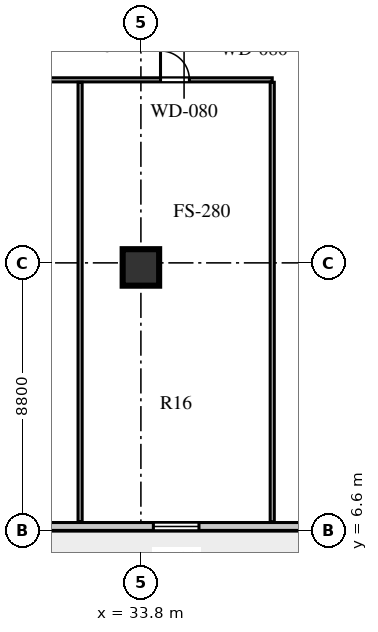
"""IFC4 building model, lengths in metres.
Left out: names, types, materials, properties, quantities, classifications, styles, units other than length and angle.
Written with IfcOpenShell. Run it as: python <this file> out.ifc"""

import sys

from ifc_helpers import new_model, si_unit, direction, frame, frame_2d, origin, origin_2d, place, context, subcontext, project, spatial, rectangle, extrude, element, fill, save


model = new_model("IFC4")
c1 = context("Model", 3, precision=1e-05, world=origin(), true_north=direction((0.0, 1.0)))
c2 = subcontext(c1, "Body", "Model", "MODEL_VIEW")
j1 = project(units=[si_unit("LENGTHUNIT", "METRE"), si_unit("PLANEANGLEUNIT", "RADIAN")], contexts=[c1])
p1 = place(None, origin())
s1 = spatial("IfcSite", under=j1, at=p1, CompositionType="ELEMENT")
p2 = place(p1, origin())
s2 = spatial("IfcBuilding", under=s1, at=p2, CompositionType="ELEMENT")
p3 = place(p2, frame((0.0, 0.0, 42.0)))
s3 = spatial("IfcBuildingStorey", under=s2, at=p3, CompositionType="ELEMENT", Elevation=42.0)
p4 = place(p3, frame((33.8, 15.25, 0.0), z_axis=(0.0, 0.0, 1.0), x_axis=(1.0, 0.0, 0.0)))
e1 = element("IfcColumn", 1, at=p4, inside=s3, PredefinedType="COLUMN", context=c2, shape_type="SweptSolid", body=[
    extrude(rectangle(XDim=1.2, YDim=1.2, at=origin_2d()), origin(), (0.0, 0.0, 1.0), 3.72),
])
p5 = place(p3, frame((12.3, 6.73, 0.0), z_axis=(0.0, 0.0, 1.0), x_axis=(1.0, 0.0, 0.0)))
e2 = element("IfcWall", 2, at=p5, inside=s3, PredefinedType="SOLIDWALL", context=c2, shape_type="SweptSolid", body=[
    extrude(rectangle(XDim=34.0, YDim=0.26, at=frame_2d((17.0, 0.0))), origin(), (0.0, 0.0, 1.0), 3.72),
])
p6 = place(p5, frame((0.95, 0.0, 0.0)))
e3 = element("IfcOpeningElement", 3, at=p6, cuts=e2, PredefinedType="OPENING", context=c2, shape_type="SweptSolid", body=[
    extrude(rectangle(XDim=1.0, YDim=2.05, at=frame_2d((0.5, 1.025))), frame((0.0, 0.14, 0.0), z_axis=(0.0, -1.0, 0.0), x_axis=(1.0, 0.0, 0.0)), (0.0, 0.0, 1.0), 0.28),
])
p7 = place(p5, frame((9.68, 0.0, 0.8)))
e4 = element("IfcOpeningElement", 4, at=p7, cuts=e2, PredefinedType="OPENING", context=c2, shape_type="SweptSolid", body=[
    extrude(rectangle(XDim=1.8, YDim=2.0, at=frame_2d((0.9, 1.0))), frame((0.0, 0.14, 0.0), z_axis=(0.0, -1.0, 0.0), x_axis=(1.0, 0.0, 0.0)), (0.0, 0.0, 1.0), 0.28),
])
p8 = place(p5, frame((21.91, 0.0, 0.8)))
e5 = element("IfcOpeningElement", 5, at=p8, cuts=e2, PredefinedType="OPENING", context=c2, shape_type="SweptSolid", body=[
    extrude(rectangle(XDim=1.5, YDim=2.0, at=frame_2d((0.75, 1.0))), frame((0.0, 0.14, 0.0), z_axis=(0.0, -1.0, 0.0), x_axis=(1.0, 0.0, 0.0)), (0.0, 0.0, 1.0), 0.28),
])
p9 = place(p5, frame((29.255, 0.0, 0.8)))
e6 = element("IfcOpeningElement", 6, at=p9, cuts=e2, PredefinedType="OPENING", context=c2, shape_type="SweptSolid", body=[
    extrude(rectangle(XDim=1.2, YDim=1.75, at=frame_2d((0.6, 0.875))), frame((0.0, 0.14, 0.0), z_axis=(0.0, -1.0, 0.0), x_axis=(1.0, 0.0, 0.0)), (0.0, 0.0, 1.0), 0.28),
])
p10 = place(p3, frame((25.25, 21.42, 0.0), z_axis=(0.0, 0.0, 1.0), x_axis=(1.0, 0.0, 0.0)))
e7 = element("IfcWall", 7, at=p10, inside=s3, PredefinedType="PARTITIONING", context=c2, shape_type="SweptSolid", body=[
    extrude(rectangle(XDim=12.87, YDim=0.135, at=frame_2d((6.435, 0.0))), origin(), (0.0, 0.0, 1.0), 3.32),
])
p11 = place(p10, frame((2.825, 0.0, 0.0)))
e8 = element("IfcOpeningElement", 8, at=p11, cuts=e7, PredefinedType="OPENING", context=c2, shape_type="SweptSolid", body=[
    extrude(rectangle(XDim=0.95, YDim=2.08, at=frame_2d((0.475, 1.04))), frame((0.0, 0.078, 0.0), z_axis=(0.0, -1.0, 0.0), x_axis=(1.0, 0.0, 0.0)), (0.0, 0.0, 1.0), 0.155),
])
p12 = place(p10, frame((9.195, 0.0, 0.0)))
e9 = element("IfcOpeningElement", 9, at=p12, cuts=e7, PredefinedType="OPENING", context=c2, shape_type="SweptSolid", body=[
    extrude(rectangle(XDim=0.95, YDim=2.08, at=frame_2d((0.475, 1.04))), frame((0.0, 0.078, 0.0), z_axis=(0.0, -1.0, 0.0), x_axis=(1.0, 0.0, 0.0)), (0.0, 0.0, 1.0), 0.155),
])
for number, where, z_axis, x_axis in (
    (10, (38.12, 6.88, 0.0), (0.0, 0.0, 1.0), (0.0, 1.0, 0.0)),
    (11, (31.8, 6.88, 0.0), (0.0, 0.0, 1.0), (0.0, 1.0, 0.0)),
):
    element("IfcWall", number, at=place(p3, frame(where, z_axis=z_axis, x_axis=x_axis)), inside=s3, PredefinedType="PARTITIONING", context=c2, shape_type="SweptSolid", body=[
        extrude(rectangle(XDim=14.46, YDim=0.135, at=frame_2d((7.23, 0.0))), origin(), (0.0, 0.0, 1.0), 3.72),
    ])
p13 = place(p8, origin())
e12 = element("IfcWindow", 12, at=p13, inside=s3, PartitioningType="SINGLE_PANEL", PredefinedType="WINDOW", context=c2, shape_type="SweptSolid", body=[
    extrude(rectangle(XDim=1.5, YDim=2.0, at=frame_2d((0.75, 1.0))), frame((0.0, 0.03, 0.0), z_axis=(0.0, -1.0, 0.0), x_axis=(1.0, 0.0, 0.0)), (0.0, 0.0, 1.0), 0.06),
])
fill(e5, e12)
p14 = place(p12, frame((0.95, 0.0, 0.0), z_axis=(0.0, 0.0, 1.0), x_axis=(-1.0, 0.0, 0.0)))
e13 = element("IfcDoor", 13, at=p14, inside=s3, OperationType="SINGLE_SWING_RIGHT", PredefinedType="DOOR", context=c2, shape_type="SweptSolid", body=[
    extrude(rectangle(XDim=0.95, YDim=2.08, at=frame_2d((0.475, 1.04))), frame((0.0, 0.025, 0.0), z_axis=(0.0, -1.0, 0.0), x_axis=(1.0, 0.0, 0.0)), (0.0, 0.0, 1.0), 0.05),
])
fill(e9, e13)
save(model, sys.argv[1])
